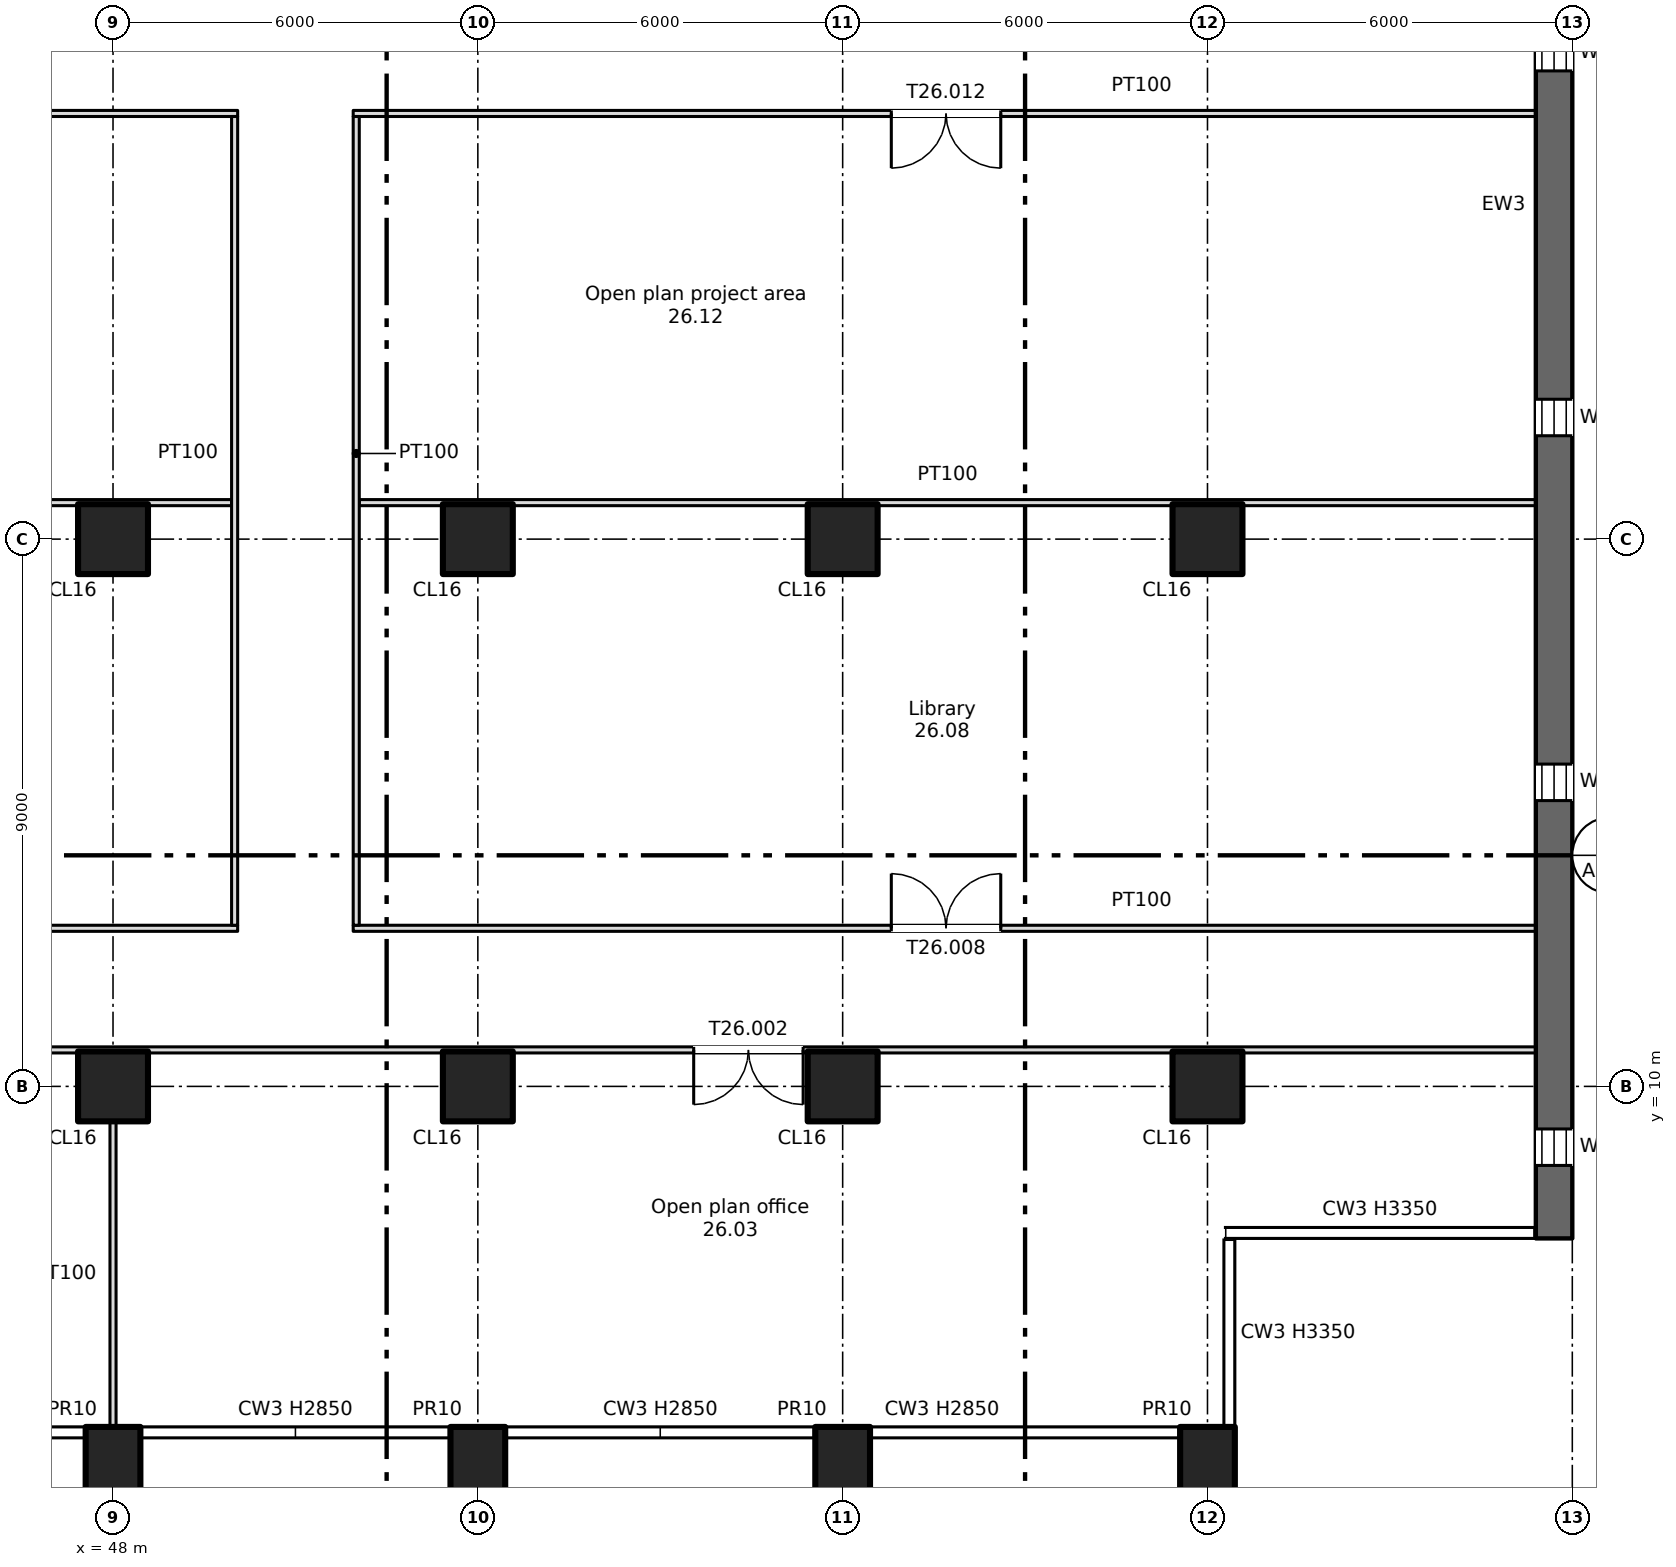
"""IFC4 building model, lengths in metres.
Left out: names, types, materials, properties, quantities, classifications, styles, units other than length and angle.
Written with IfcOpenShell. Run it as: python <this file> out.ifc"""

import sys

from ifc_helpers import new_model, si_unit, direction, frame, frame_2d, origin, origin_2d, place, context, subcontext, project, spatial, rectangle, extrude, element, fill, save


model = new_model("IFC4")
c1 = context("Model", 3, precision=1e-05, world=origin(), true_north=direction((0.0, 1.0)))
c2 = subcontext(c1, "Body", "Model", "MODEL_VIEW")
j1 = project(units=[si_unit("LENGTHUNIT", "METRE"), si_unit("PLANEANGLEUNIT", "RADIAN")], contexts=[c1])
p1 = place(None, origin())
s1 = spatial("IfcSite", under=j1, at=p1, CompositionType="ELEMENT")
p2 = place(p1, origin())
s2 = spatial("IfcBuilding", under=s1, at=p2, CompositionType="ELEMENT")
p3 = place(p2, frame((0.0, 0.0, 181.75)))
s3 = spatial("IfcBuildingStorey", under=s2, at=p3, CompositionType="ELEMENT", Elevation=181.75)
for number, where, z_axis, x_axis in (
    (1, (48.0, 3.7, -0.4), (0.0, 0.0, 1.0), (1.0, 0.0, 0.0)),
    (2, (54.0, 3.7, -0.4), (0.0, 0.0, 1.0), (1.0, 0.0, 0.0)),
    (3, (60.0, 3.7, -0.4), (0.0, 0.0, 1.0), (1.0, 0.0, 0.0)),
    (4, (66.0, 3.7, -0.4), (0.0, 0.0, 1.0), (1.0, 0.0, 0.0)),
):
    element("IfcColumn", number, at=place(p3, frame(where, z_axis=z_axis, x_axis=x_axis)), inside=s3, PredefinedType="COLUMN", context=c2, shape_type="SweptSolid", body=[
        extrude(rectangle(XDim=0.9, YDim=1.4, at=origin_2d()), origin(), (0.0, 0.0, 1.0), 3.75),
    ])
for number, where, z_axis, x_axis in (
    (5, (48.0, 10.0, 0.0), (0.0, 0.0, 1.0), (1.0, 0.0, 0.0)),
    (6, (48.0, 19.0, 0.0), (0.0, 0.0, 1.0), (1.0, 0.0, 0.0)),
    (7, (54.0, 10.0, 0.0), (0.0, 0.0, 1.0), (1.0, 0.0, 0.0)),
    (8, (54.0, 19.0, 0.0), (0.0, 0.0, 1.0), (1.0, 0.0, 0.0)),
    (9, (60.0, 10.0, 0.0), (0.0, 0.0, 1.0), (1.0, 0.0, 0.0)),
    (10, (60.0, 19.0, 0.0), (0.0, 0.0, 1.0), (1.0, 0.0, 0.0)),
    (11, (66.0, 10.0, 0.0), (0.0, 0.0, 1.0), (1.0, 0.0, 0.0)),
    (12, (66.0, 19.0, 0.0), (0.0, 0.0, 1.0), (1.0, 0.0, 0.0)),
):
    element("IfcColumn", number, at=place(p3, frame(where, z_axis=z_axis, x_axis=x_axis)), inside=s3, PredefinedType="COLUMN", context=c2, shape_type="SweptSolid", body=[
        extrude(rectangle(XDim=1.15, YDim=1.15, at=origin_2d()), origin(), (0.0, 0.0, 1.0), 3.35),
    ])
p4 = place(p3, frame((71.7, 7.5, 0.0), z_axis=(0.0, 0.0, 1.0), x_axis=(0.0, 1.0, 0.0)))
e13 = element("IfcWall", 13, at=p4, inside=s3, PredefinedType="SHEAR", context=c2, shape_type="SweptSolid", body=[
    extrude(rectangle(XDim=34.0, YDim=0.6, at=frame_2d((17.0, 0.0))), origin(), (0.0, 0.0, 1.0), 3.35),
])
p5 = place(p4, frame((1.2, 0.0, 0.6)))
e14 = element("IfcOpeningElement", 14, at=p5, cuts=e13, PredefinedType="OPENING", context=c2, shape_type="SweptSolid", body=[
    extrude(rectangle(XDim=0.6, YDim=2.4, at=frame_2d((0.3, 1.2))), frame((0.0, 0.31, 0.0), z_axis=(0.0, -1.0, 0.0), x_axis=(1.0, 0.0, 0.0)), (0.0, 0.0, 1.0), 0.62),
])
p6 = place(p4, frame((7.2, 0.0, 0.6)))
e15 = element("IfcOpeningElement", 15, at=p6, cuts=e13, PredefinedType="OPENING", context=c2, shape_type="SweptSolid", body=[
    extrude(rectangle(XDim=0.6, YDim=2.4, at=frame_2d((0.3, 1.2))), frame((0.0, 0.31, 0.0), z_axis=(0.0, -1.0, 0.0), x_axis=(1.0, 0.0, 0.0)), (0.0, 0.0, 1.0), 0.62),
])
p7 = place(p4, frame((13.2, 0.0, 0.6)))
e16 = element("IfcOpeningElement", 16, at=p7, cuts=e13, PredefinedType="OPENING", context=c2, shape_type="SweptSolid", body=[
    extrude(rectangle(XDim=0.6, YDim=2.4, at=frame_2d((0.3, 1.2))), frame((0.0, 0.31, 0.0), z_axis=(0.0, -1.0, 0.0), x_axis=(1.0, 0.0, 0.0)), (0.0, 0.0, 1.0), 0.62),
])
p8 = place(p4, frame((19.2, 0.0, 0.6)))
e17 = element("IfcOpeningElement", 17, at=p8, cuts=e13, PredefinedType="OPENING", context=c2, shape_type="SweptSolid", body=[
    extrude(rectangle(XDim=0.6, YDim=2.4, at=frame_2d((0.3, 1.2))), frame((0.0, 0.31, 0.0), z_axis=(0.0, -1.0, 0.0), x_axis=(1.0, 0.0, 0.0)), (0.0, 0.0, 1.0), 0.62),
])
p9 = place(p3, frame((6.6, 10.6, 0.0), z_axis=(0.0, 0.0, 1.0), x_axis=(1.0, 0.0, 0.0)))
e18 = element("IfcWall", 18, at=p9, inside=s3, PredefinedType="PARTITIONING", context=c2, shape_type="SweptSolid", body=[
    extrude(rectangle(XDim=64.8, YDim=0.1, at=frame_2d((32.4, 0.0))), origin(), (0.0, 0.0, 1.0), 3.35),
])
p10 = place(p9, frame((30.0, 0.0, 0.0)))
e19 = element("IfcOpeningElement", 19, at=p10, cuts=e18, PredefinedType="OPENING", context=c2, shape_type="SweptSolid", body=[
    extrude(rectangle(XDim=1.8, YDim=2.1, at=frame_2d((0.9, 1.05))), frame((0.0, 0.06, 0.0), z_axis=(0.0, -1.0, 0.0), x_axis=(1.0, 0.0, 0.0)), (0.0, 0.0, 1.0), 0.12),
])
p11 = place(p9, frame((50.95, 0.0, 0.0)))
e20 = element("IfcOpeningElement", 20, at=p11, cuts=e18, PredefinedType="OPENING", context=c2, shape_type="SweptSolid", body=[
    extrude(rectangle(XDim=1.8, YDim=2.1, at=frame_2d((0.9, 1.05))), frame((0.0, 0.06, 0.0), z_axis=(0.0, -1.0, 0.0), x_axis=(1.0, 0.0, 0.0)), (0.0, 0.0, 1.0), 0.12),
])
p12 = place(p9, frame((7.8, 0.0, 0.0)))
e21 = element("IfcOpeningElement", 21, at=p12, cuts=e18, PredefinedType="OPENING", context=c2, shape_type="SweptSolid", body=[
    extrude(rectangle(XDim=1.8, YDim=2.1, at=frame_2d((0.9, 1.05))), frame((0.0, 0.06, 0.0), z_axis=(0.0, -1.0, 0.0), x_axis=(1.0, 0.0, 0.0)), (0.0, 0.0, 1.0), 0.12),
])
p13 = place(p3, frame((27.95, 12.6, 0.0), z_axis=(0.0, 0.0, 1.0), x_axis=(1.0, 0.0, 0.0)))
e22 = element("IfcWall", 22, at=p13, inside=s3, PredefinedType="PARTITIONING", context=c2, shape_type="SweptSolid", body=[
    extrude(rectangle(XDim=22.1, YDim=0.1, at=frame_2d((11.05, 0.0))), origin(), (0.0, 0.0, 1.0), 3.35),
])
p14 = place(p13, frame((4.95, 0.0, 0.0)))
e23 = element("IfcOpeningElement", 23, at=p14, cuts=e22, PredefinedType="OPENING", context=c2, shape_type="SweptSolid", body=[
    extrude(rectangle(XDim=1.2, YDim=2.1, at=frame_2d((0.6, 1.05))), frame((0.0, 0.06, 0.0), z_axis=(0.0, -1.0, 0.0), x_axis=(1.0, 0.0, 0.0)), (0.0, 0.0, 1.0), 0.12),
])
p15 = place(p13, frame((15.95, 0.0, 0.0)))
e24 = element("IfcOpeningElement", 24, at=p15, cuts=e22, PredefinedType="OPENING", context=c2, shape_type="SweptSolid", body=[
    extrude(rectangle(XDim=1.2, YDim=2.1, at=frame_2d((0.6, 1.05))), frame((0.0, 0.06, 0.0), z_axis=(0.0, -1.0, 0.0), x_axis=(1.0, 0.0, 0.0)), (0.0, 0.0, 1.0), 0.12),
])
p16 = place(p3, frame((51.95, 12.6, 0.0), z_axis=(0.0, 0.0, 1.0), x_axis=(1.0, 0.0, 0.0)))
e25 = element("IfcWall", 25, at=p16, inside=s3, PredefinedType="PARTITIONING", context=c2, shape_type="SweptSolid", body=[
    extrude(rectangle(XDim=19.45, YDim=0.1, at=frame_2d((9.725, 0.0))), origin(), (0.0, 0.0, 1.0), 3.35),
])
p17 = place(p16, frame((8.85, 0.0, 0.0)))
e26 = element("IfcOpeningElement", 26, at=p17, cuts=e25, PredefinedType="OPENING", context=c2, shape_type="SweptSolid", body=[
    extrude(rectangle(XDim=1.8, YDim=2.1, at=frame_2d((0.9, 1.05))), frame((0.0, 0.06, 0.0), z_axis=(0.0, -1.0, 0.0), x_axis=(1.0, 0.0, 0.0)), (0.0, 0.0, 1.0), 0.12),
])
p18 = place(p3, frame((28.05, 19.6, 0.0), z_axis=(0.0, 0.0, 1.0), x_axis=(1.0, 0.0, 0.0)))
e27 = element("IfcWall", 27, at=p18, inside=s3, PredefinedType="PARTITIONING", context=c2, shape_type="SweptSolid", body=[
    extrude(rectangle(XDim=21.9, YDim=0.1, at=frame_2d((10.95, 0.0))), origin(), (0.0, 0.0, 1.0), 3.35),
])
p19 = place(p3, frame((52.05, 19.6, 0.0), z_axis=(0.0, 0.0, 1.0), x_axis=(1.0, 0.0, 0.0)))
e28 = element("IfcWall", 28, at=p19, inside=s3, PredefinedType="PARTITIONING", context=c2, shape_type="SweptSolid", body=[
    extrude(rectangle(XDim=19.35, YDim=0.1, at=frame_2d((9.675, 0.0))), origin(), (0.0, 0.0, 1.0), 3.35),
])
p20 = place(p3, frame((27.95, 26.0, 0.0), z_axis=(0.0, 0.0, 1.0), x_axis=(1.0, 0.0, 0.0)))
e29 = element("IfcWall", 29, at=p20, inside=s3, PredefinedType="PARTITIONING", context=c2, shape_type="SweptSolid", body=[
    extrude(rectangle(XDim=22.1, YDim=0.1, at=frame_2d((11.05, 0.0))), origin(), (0.0, 0.0, 1.0), 3.35),
])
p21 = place(p20, frame((10.15, 0.0, 0.0)))
e30 = element("IfcOpeningElement", 30, at=p21, cuts=e29, PredefinedType="OPENING", context=c2, shape_type="SweptSolid", body=[
    extrude(rectangle(XDim=1.8, YDim=2.1, at=frame_2d((0.9, 1.05))), frame((0.0, 0.06, 0.0), z_axis=(0.0, -1.0, 0.0), x_axis=(1.0, 0.0, 0.0)), (0.0, 0.0, 1.0), 0.12),
])
p22 = place(p3, frame((51.95, 26.0, 0.0), z_axis=(0.0, 0.0, 1.0), x_axis=(1.0, 0.0, 0.0)))
e31 = element("IfcWall", 31, at=p22, inside=s3, PredefinedType="PARTITIONING", context=c2, shape_type="SweptSolid", body=[
    extrude(rectangle(XDim=19.45, YDim=0.1, at=frame_2d((9.725, 0.0))), origin(), (0.0, 0.0, 1.0), 3.35),
])
p23 = place(p22, frame((8.85, 0.0, 0.0)))
e32 = element("IfcOpeningElement", 32, at=p23, cuts=e31, PredefinedType="OPENING", context=c2, shape_type="SweptSolid", body=[
    extrude(rectangle(XDim=1.8, YDim=2.1, at=frame_2d((0.9, 1.05))), frame((0.0, 0.06, 0.0), z_axis=(0.0, -1.0, 0.0), x_axis=(1.0, 0.0, 0.0)), (0.0, 0.0, 1.0), 0.12),
])
p24 = place(p3, frame((48.0, 4.4, 0.0), z_axis=(0.0, 0.0, 1.0), x_axis=(0.0, 1.0, 0.0)))
e33 = element("IfcWall", 33, at=p24, inside=s3, PredefinedType="PARTITIONING", context=c2, shape_type="SweptSolid", body=[
    extrude(rectangle(XDim=5.025, YDim=0.1, at=frame_2d((2.513, 0.0))), origin(), (0.0, 0.0, 1.0), 3.35),
])
for number, where, z_axis, x_axis in (
    (34, (50.0, 12.65, 0.0), (0.0, 0.0, 1.0), (0.0, 1.0, 0.0)),
    (35, (52.0, 12.65, 0.0), (0.0, 0.0, 1.0), (0.0, 1.0, 0.0)),
):
    element("IfcWall", number, at=place(p3, frame(where, z_axis=z_axis, x_axis=x_axis)), inside=s3, PredefinedType="PARTITIONING", context=c2, shape_type="SweptSolid", body=[
        extrude(rectangle(XDim=13.3, YDim=0.1, at=frame_2d((6.65, 0.0))), origin(), (0.0, 0.0, 1.0), 3.35),
    ])
p25 = place(p5, origin())
e36 = element("IfcWindow", 36, at=p25, inside=s3, PartitioningType="SINGLE_PANEL", PredefinedType="WINDOW", context=c2, shape_type="SweptSolid", body=[
    extrude(rectangle(XDim=0.6, YDim=2.4, at=frame_2d((0.3, 1.2))), frame((0.0, 0.03, 0.0), z_axis=(0.0, -1.0, 0.0), x_axis=(1.0, 0.0, 0.0)), (0.0, 0.0, 1.0), 0.06),
])
fill(e14, e36)
p26 = place(p6, origin())
e37 = element("IfcWindow", 37, at=p26, inside=s3, PartitioningType="SINGLE_PANEL", PredefinedType="WINDOW", context=c2, shape_type="SweptSolid", body=[
    extrude(rectangle(XDim=0.6, YDim=2.4, at=frame_2d((0.3, 1.2))), frame((0.0, 0.03, 0.0), z_axis=(0.0, -1.0, 0.0), x_axis=(1.0, 0.0, 0.0)), (0.0, 0.0, 1.0), 0.06),
])
fill(e15, e37)
p27 = place(p7, origin())
e38 = element("IfcWindow", 38, at=p27, inside=s3, PartitioningType="SINGLE_PANEL", PredefinedType="WINDOW", context=c2, shape_type="SweptSolid", body=[
    extrude(rectangle(XDim=0.6, YDim=2.4, at=frame_2d((0.3, 1.2))), frame((0.0, 0.03, 0.0), z_axis=(0.0, -1.0, 0.0), x_axis=(1.0, 0.0, 0.0)), (0.0, 0.0, 1.0), 0.06),
])
fill(e16, e38)
p28 = place(p8, origin())
e39 = element("IfcWindow", 39, at=p28, inside=s3, PartitioningType="SINGLE_PANEL", PredefinedType="WINDOW", context=c2, shape_type="SweptSolid", body=[
    extrude(rectangle(XDim=0.6, YDim=2.4, at=frame_2d((0.3, 1.2))), frame((0.0, 0.03, 0.0), z_axis=(0.0, -1.0, 0.0), x_axis=(1.0, 0.0, 0.0)), (0.0, 0.0, 1.0), 0.06),
])
fill(e17, e39)
p29 = place(p11, origin())
e40 = element("IfcDoor", 40, at=p29, inside=s3, OperationType="DOUBLE_DOOR_SINGLE_SWING", PredefinedType="DOOR", context=c2, shape_type="SweptSolid", body=[
    extrude(rectangle(XDim=1.8, YDim=2.1, at=frame_2d((0.9, 1.05))), frame((0.0, 0.025, 0.0), z_axis=(0.0, -1.0, 0.0), x_axis=(1.0, 0.0, 0.0)), (0.0, 0.0, 1.0), 0.05),
])
fill(e20, e40)
p30 = place(p17, origin())
e41 = element("IfcDoor", 41, at=p30, inside=s3, OperationType="DOUBLE_DOOR_SINGLE_SWING", PredefinedType="DOOR", context=c2, shape_type="SweptSolid", body=[
    extrude(rectangle(XDim=1.8, YDim=2.1, at=frame_2d((0.9, 1.05))), frame((0.0, 0.025, 0.0), z_axis=(0.0, -1.0, 0.0), x_axis=(1.0, 0.0, 0.0)), (0.0, 0.0, 1.0), 0.05),
])
fill(e26, e41)
p31 = place(p23, origin())
e42 = element("IfcDoor", 42, at=p31, inside=s3, OperationType="DOUBLE_DOOR_SINGLE_SWING", PredefinedType="DOOR", context=c2, shape_type="SweptSolid", body=[
    extrude(rectangle(XDim=1.8, YDim=2.1, at=frame_2d((0.9, 1.05))), frame((0.0, 0.025, 0.0), z_axis=(0.0, -1.0, 0.0), x_axis=(1.0, 0.0, 0.0)), (0.0, 0.0, 1.0), 0.05),
])
fill(e32, e42)
save(model, sys.argv[1])
